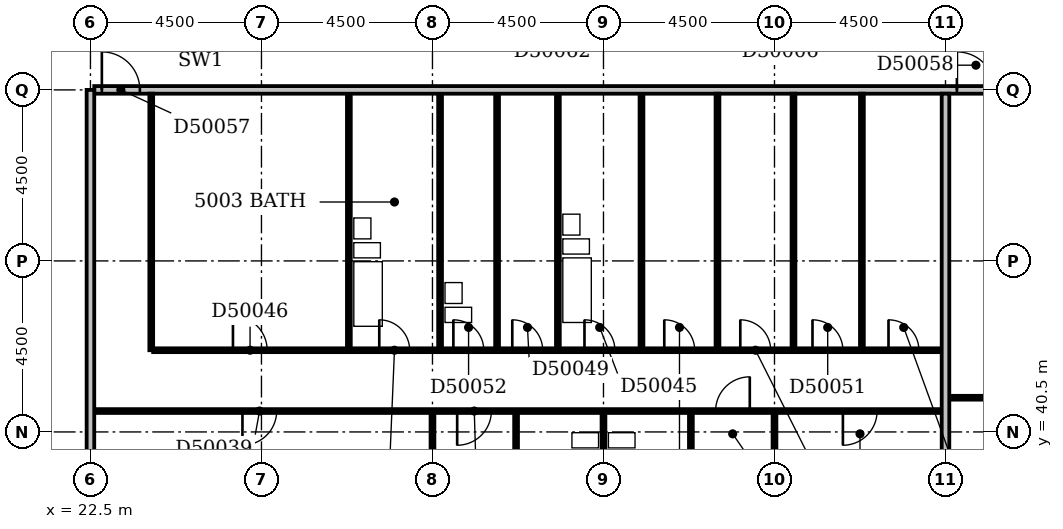
"""IFC4 building model, lengths in metres.
Left out: names, types, materials, properties, quantities, classifications, styles, units other than length and angle.
Written with IfcOpenShell. Run it as: python <this file> out.ifc"""

import sys

from ifc_helpers import new_model, si_unit, direction, frame, frame_2d, origin, place, context, subcontext, project, spatial, rectangle, extrude, element, fill, save


model = new_model("IFC4")
c1 = context("Model", 3, precision=1e-05, world=origin(), true_north=direction((0.0, 1.0)))
c2 = subcontext(c1, "Body", "Model", "MODEL_VIEW")
j1 = project(units=[si_unit("LENGTHUNIT", "METRE"), si_unit("PLANEANGLEUNIT", "RADIAN")], contexts=[c1])
p1 = place(None, origin())
s1 = spatial("IfcSite", under=j1, at=p1, CompositionType="ELEMENT")
p2 = place(p1, origin())
s2 = spatial("IfcBuilding", under=s1, at=p2, CompositionType="ELEMENT")
p3 = place(p2, frame((0.0, 0.0, 197.0)))
s3 = spatial("IfcBuildingStorey", under=s2, at=p3, CompositionType="ELEMENT", Elevation=197.0)
p4 = place(p3, frame((22.5, 36.45, 0.0), z_axis=(0.0, 0.0, 1.0), x_axis=(0.0, 1.0, 0.0)))
e1 = element("IfcWall", 1, at=p4, inside=s3, PredefinedType="PARTITIONING", context=c2, shape_type="SweptSolid", body=[
    extrude(rectangle(XDim=13.05, YDim=0.2, at=frame_2d((6.525, 0.0))), origin(), (0.0, 0.0, 1.0), 3.3),
])
p5 = place(p3, frame((31.5, 36.45, 0.0), z_axis=(0.0, 0.0, 1.0), x_axis=(0.0, 1.0, 0.0)))
e2 = element("IfcWall", 2, at=p5, inside=s3, PredefinedType="PARTITIONING", context=c2, shape_type="SweptSolid", body=[
    extrude(rectangle(XDim=4.55, YDim=0.1, at=frame_2d((2.275, 0.0))), origin(), (0.0, 0.0, 1.0), 3.3),
])
p6 = place(p3, frame((36.0, 36.45, 0.0), z_axis=(0.0, 0.0, 1.0), x_axis=(0.0, 1.0, 0.0)))
e3 = element("IfcWall", 3, at=p6, inside=s3, PredefinedType="PARTITIONING", context=c2, shape_type="SweptSolid", body=[
    extrude(rectangle(XDim=4.55, YDim=0.1, at=frame_2d((2.275, 0.0))), origin(), (0.0, 0.0, 1.0), 2.4),
])
p7 = place(p3, frame((40.5, 36.45, 0.0), z_axis=(0.0, 0.0, 1.0), x_axis=(0.0, 1.0, 0.0)))
e4 = element("IfcWall", 4, at=p7, inside=s3, PredefinedType="PARTITIONING", context=c2, shape_type="SweptSolid", body=[
    extrude(rectangle(XDim=4.55, YDim=0.1, at=frame_2d((2.275, 0.0))), origin(), (0.0, 0.0, 1.0), 3.3),
])
p8 = place(p3, frame((45.0, 36.45, 0.0), z_axis=(0.0, 0.0, 1.0), x_axis=(0.0, 1.0, 0.0)))
e5 = element("IfcWall", 5, at=p8, inside=s3, PredefinedType="PARTITIONING", context=c2, shape_type="SweptSolid", body=[
    extrude(rectangle(XDim=12.95, YDim=0.2, at=frame_2d((6.475, 0.0))), origin(), (0.0, 0.0, 1.0), 2.6),
])
p9 = place(p3, frame((33.7, 38.15, 0.0), z_axis=(0.0, 0.0, 1.0), x_axis=(0.0, 1.0, 0.0)))
e6 = element("IfcWall", 6, at=p9, inside=s3, PredefinedType="PLUMBINGWALL", context=c2, shape_type="SweptSolid", body=[
    extrude(rectangle(XDim=2.85, YDim=0.1, at=frame_2d((1.425, 0.0))), origin(), (0.0, 0.0, 1.0), 3.3),
])
p10 = place(p9, frame((1.05, 0.0, 0.0)))
e7 = element("IfcOpeningElement", 7, at=p10, cuts=e6, PredefinedType="OPENING", context=c2, shape_type="SweptSolid", body=[
    extrude(rectangle(XDim=0.8, YDim=2.1, at=frame_2d((0.4, 1.05))), frame((0.0, 0.062, 0.0), z_axis=(0.0, -1.0, 0.0), x_axis=(1.0, 0.0, 0.0)), (0.0, 0.0, 1.0), 0.124),
])
p11 = place(p3, frame((38.3, 38.15, 0.0), z_axis=(0.0, 0.0, 1.0), x_axis=(0.0, 1.0, 0.0)))
e8 = element("IfcWall", 8, at=p11, inside=s3, PredefinedType="PLUMBINGWALL", context=c2, shape_type="SweptSolid", body=[
    extrude(rectangle(XDim=2.85, YDim=0.1, at=frame_2d((1.425, 0.0))), origin(), (0.0, 0.0, 1.0), 3.3),
])
p12 = place(p11, frame((1.05, 0.0, 0.0)))
e9 = element("IfcOpeningElement", 9, at=p12, cuts=e8, PredefinedType="OPENING", context=c2, shape_type="SweptSolid", body=[
    extrude(rectangle(XDim=0.8, YDim=2.1, at=frame_2d((0.4, 1.05))), frame((0.0, 0.062, 0.0), z_axis=(0.0, -1.0, 0.0), x_axis=(1.0, 0.0, 0.0)), (0.0, 0.0, 1.0), 0.124),
])
p13 = place(p3, frame((22.6, 41.05, 0.0), z_axis=(0.0, 0.0, 1.0), x_axis=(1.0, 0.0, 0.0)))
e10 = element("IfcWall", 10, at=p13, inside=s3, PredefinedType="PARTITIONING", context=c2, shape_type="SweptSolid", body=[
    extrude(rectangle(XDim=22.3, YDim=0.1, at=frame_2d((11.15, 0.0))), origin(), (0.0, 0.0, 1.0), 3.3),
])
p14 = place(p13, frame((3.9, 0.0, 0.0)))
e11 = element("IfcOpeningElement", 11, at=p14, cuts=e10, PredefinedType="OPENING", context=c2, shape_type="SweptSolid", body=[
    extrude(rectangle(XDim=0.9, YDim=2.1, at=frame_2d((0.45, 1.05))), frame((0.0, 0.062, 0.0), z_axis=(0.0, -1.0, 0.0), x_axis=(1.0, 0.0, 0.0)), (0.0, 0.0, 1.0), 0.124),
])
p15 = place(p13, frame((9.55, 0.0, 0.0)))
e12 = element("IfcOpeningElement", 12, at=p15, cuts=e10, PredefinedType="OPENING", context=c2, shape_type="SweptSolid", body=[
    extrude(rectangle(XDim=0.9, YDim=2.1, at=frame_2d((0.45, 1.05))), frame((0.0, 0.062, 0.0), z_axis=(0.0, -1.0, 0.0), x_axis=(1.0, 0.0, 0.0)), (0.0, 0.0, 1.0), 0.124),
])
p16 = place(p13, frame((16.35, 0.0, 0.0)))
e13 = element("IfcOpeningElement", 13, at=p16, cuts=e10, PredefinedType="OPENING", context=c2, shape_type="SweptSolid", body=[
    extrude(rectangle(XDim=0.9, YDim=2.1, at=frame_2d((0.45, 1.05))), frame((0.0, 0.062, 0.0), z_axis=(0.0, -1.0, 0.0), x_axis=(1.0, 0.0, 0.0)), (0.0, 0.0, 1.0), 0.124),
])
p17 = place(p13, frame((19.7, 0.0, 0.0)))
e14 = element("IfcOpeningElement", 14, at=p17, cuts=e10, PredefinedType="OPENING", context=c2, shape_type="SweptSolid", body=[
    extrude(rectangle(XDim=0.9, YDim=2.1, at=frame_2d((0.45, 1.05))), frame((0.0, 0.062, 0.0), z_axis=(0.0, -1.0, 0.0), x_axis=(1.0, 0.0, 0.0)), (0.0, 0.0, 1.0), 0.124),
])
p18 = place(p3, frame((45.1, 41.4, 0.0), z_axis=(0.0, 0.0, 1.0), x_axis=(1.0, 0.0, 0.0)))
e15 = element("IfcWall", 15, at=p18, inside=s3, PredefinedType="PARTITIONING", context=c2, shape_type="SweptSolid", body=[
    extrude(rectangle(XDim=9.5, YDim=0.1, at=frame_2d((4.75, 0.0))), origin(), (0.0, 0.0, 1.0), 3.3),
])
p19 = place(p18, frame((3.95, 0.0, 0.0)))
e16 = element("IfcOpeningElement", 16, at=p19, cuts=e15, PredefinedType="OPENING", context=c2, shape_type="SweptSolid", body=[
    extrude(rectangle(XDim=0.9, YDim=2.1, at=frame_2d((0.45, 1.05))), frame((0.0, 0.062, 0.0), z_axis=(0.0, -1.0, 0.0), x_axis=(1.0, 0.0, 0.0)), (0.0, 0.0, 1.0), 0.124),
])
p20 = place(p3, frame((24.1, 42.65, 0.0), z_axis=(0.0, 0.0, 1.0), x_axis=(0.0, 1.0, 0.0)))
e17 = element("IfcWall", 17, at=p20, inside=s3, PredefinedType="PARTITIONING", context=c2, shape_type="SweptSolid", body=[
    extrude(rectangle(XDim=6.75, YDim=0.1, at=frame_2d((3.375, 0.0))), origin(), (0.0, 0.0, 1.0), 3.3),
])
p21 = place(p3, frame((24.15, 42.65, 0.0), z_axis=(0.0, 0.0, 1.0), x_axis=(1.0, 0.0, 0.0)))
e18 = element("IfcWall", 18, at=p21, inside=s3, PredefinedType="PARTITIONING", context=c2, shape_type="SweptSolid", body=[
    extrude(rectangle(XDim=20.75, YDim=0.1, at=frame_2d((10.375, 0.0))), origin(), (0.0, 0.0, 1.0), 3.3),
])
p22 = place(p21, frame((5.95, 0.0, 0.0)))
e19 = element("IfcOpeningElement", 19, at=p22, cuts=e18, PredefinedType="OPENING", context=c2, shape_type="SweptSolid", body=[
    extrude(rectangle(XDim=0.8, YDim=2.1, at=frame_2d((0.4, 1.05))), frame((0.0, 0.062, 0.0), z_axis=(0.0, -1.0, 0.0), x_axis=(1.0, 0.0, 0.0)), (0.0, 0.0, 1.0), 0.124),
])
p23 = place(p21, frame((11.35, 0.0, 0.0)))
e20 = element("IfcOpeningElement", 20, at=p23, cuts=e18, PredefinedType="OPENING", context=c2, shape_type="SweptSolid", body=[
    extrude(rectangle(XDim=0.8, YDim=2.1, at=frame_2d((0.4, 1.05))), frame((0.0, 0.062, 0.0), z_axis=(0.0, -1.0, 0.0), x_axis=(1.0, 0.0, 0.0)), (0.0, 0.0, 1.0), 0.124),
])
p24 = place(p21, frame((2.1, 0.0, 0.0)))
e21 = element("IfcOpeningElement", 21, at=p24, cuts=e18, PredefinedType="OPENING", context=c2, shape_type="SweptSolid", body=[
    extrude(rectangle(XDim=0.9, YDim=2.1, at=frame_2d((0.45, 1.05))), frame((0.0, 0.062, 0.0), z_axis=(0.0, -1.0, 0.0), x_axis=(1.0, 0.0, 0.0)), (0.0, 0.0, 1.0), 0.124),
])
p25 = place(p21, frame((19.35, 0.0, 0.0)))
e22 = element("IfcOpeningElement", 22, at=p25, cuts=e18, PredefinedType="OPENING", context=c2, shape_type="SweptSolid", body=[
    extrude(rectangle(XDim=0.8, YDim=2.1, at=frame_2d((0.4, 1.05))), frame((0.0, 0.062, 0.0), z_axis=(0.0, -1.0, 0.0), x_axis=(1.0, 0.0, 0.0)), (0.0, 0.0, 1.0), 0.124),
])
p26 = place(p21, frame((15.45, 0.0, 0.0)))
e23 = element("IfcOpeningElement", 23, at=p26, cuts=e18, PredefinedType="OPENING", context=c2, shape_type="SweptSolid", body=[
    extrude(rectangle(XDim=0.8, YDim=2.1, at=frame_2d((0.4, 1.05))), frame((0.0, 0.062, 0.0), z_axis=(0.0, -1.0, 0.0), x_axis=(1.0, 0.0, 0.0)), (0.0, 0.0, 1.0), 0.124),
])
p27 = place(p21, frame((9.45, 0.0, 0.0)))
e24 = element("IfcOpeningElement", 24, at=p27, cuts=e18, PredefinedType="OPENING", context=c2, shape_type="SweptSolid", body=[
    extrude(rectangle(XDim=0.8, YDim=2.1, at=frame_2d((0.4, 1.05))), frame((0.0, 0.062, 0.0), z_axis=(0.0, -1.0, 0.0), x_axis=(1.0, 0.0, 0.0)), (0.0, 0.0, 1.0), 0.124),
])
p28 = place(p21, frame((13.45, 0.0, 0.0)))
e25 = element("IfcOpeningElement", 25, at=p28, cuts=e18, PredefinedType="OPENING", context=c2, shape_type="SweptSolid", body=[
    extrude(rectangle(XDim=0.8, YDim=2.1, at=frame_2d((0.4, 1.05))), frame((0.0, 0.062, 0.0), z_axis=(0.0, -1.0, 0.0), x_axis=(1.0, 0.0, 0.0)), (0.0, 0.0, 1.0), 0.124),
])
p29 = place(p21, frame((17.35, 0.0, 0.0)))
e26 = element("IfcOpeningElement", 26, at=p29, cuts=e18, PredefinedType="OPENING", context=c2, shape_type="SweptSolid", body=[
    extrude(rectangle(XDim=0.8, YDim=2.1, at=frame_2d((0.4, 1.05))), frame((0.0, 0.062, 0.0), z_axis=(0.0, -1.0, 0.0), x_axis=(1.0, 0.0, 0.0)), (0.0, 0.0, 1.0), 0.124),
])
p30 = place(p21, frame((7.9, 0.0, 0.0)))
e27 = element("IfcOpeningElement", 27, at=p30, cuts=e18, PredefinedType="OPENING", context=c2, shape_type="SweptSolid", body=[
    extrude(rectangle(XDim=0.8, YDim=2.1, at=frame_2d((0.4, 1.05))), frame((0.0, 0.062, 0.0), z_axis=(0.0, -1.0, 0.0), x_axis=(1.0, 0.0, 0.0)), (0.0, 0.0, 1.0), 0.124),
])
for number, where, z_axis, x_axis in (
    (28, (29.3, 42.7, 0.0), (0.0, 0.0, 1.0), (0.0, 1.0, 0.0)),
    (29, (31.7, 42.7, 0.0), (0.0, 0.0, 1.0), (0.0, 1.0, 0.0)),
    (30, (33.2, 42.7, 0.0), (0.0, 0.0, 1.0), (0.0, 1.0, 0.0)),
    (31, (34.8, 42.7, 0.0), (0.0, 0.0, 1.0), (0.0, 1.0, 0.0)),
    (32, (37.0, 42.7, 0.0), (0.0, 0.0, 1.0), (0.0, 1.0, 0.0)),
):
    element("IfcWall", number, at=place(p3, frame(where, z_axis=z_axis, x_axis=x_axis)), inside=s3, PredefinedType="PLUMBINGWALL", context=c2, shape_type="SweptSolid", body=[
        extrude(rectangle(XDim=6.7, YDim=0.1, at=frame_2d((3.35, 0.0))), origin(), (0.0, 0.0, 1.0), 3.3),
    ])
for number, where, z_axis, x_axis in (
    (33, (39.0, 42.7, 0.0), (0.0, 0.0, 1.0), (0.0, 1.0, 0.0)),
    (34, (41.0, 42.7, 0.0), (0.0, 0.0, 1.0), (0.0, 1.0, 0.0)),
    (35, (42.8, 42.7, 0.0), (0.0, 0.0, 1.0), (0.0, 1.0, 0.0)),
):
    element("IfcWall", number, at=place(p3, frame(where, z_axis=z_axis, x_axis=x_axis)), inside=s3, PredefinedType="PARTITIONING", context=c2, shape_type="SweptSolid", body=[
        extrude(rectangle(XDim=6.7, YDim=0.1, at=frame_2d((3.35, 0.0))), origin(), (0.0, 0.0, 1.0), 3.3),
    ])
p31 = place(p3, frame((22.6, 49.5, 0.0), z_axis=(0.0, 0.0, 1.0), x_axis=(1.0, 0.0, 0.0)))
e36 = element("IfcWall", 36, at=p31, inside=s3, PredefinedType="PARTITIONING", context=c2, shape_type="SweptSolid", body=[
    extrude(rectangle(XDim=30.95, YDim=0.2, at=frame_2d((15.475, 0.0))), origin(), (0.0, 0.0, 1.0), 3.3),
])
p32 = place(p31, frame((0.2, 0.0, 0.0)))
e37 = element("IfcOpeningElement", 37, at=p32, cuts=e36, PredefinedType="OPENING", context=c2, shape_type="SweptSolid", body=[
    extrude(rectangle(XDim=1.0, YDim=2.1, at=frame_2d((0.5, 1.05))), frame((0.0, 0.112, 0.0), z_axis=(0.0, -1.0, 0.0), x_axis=(1.0, 0.0, 0.0)), (0.0, 0.0, 1.0), 0.224),
])
p33 = place(p31, frame((22.7, 0.0, 0.0)))
e38 = element("IfcOpeningElement", 38, at=p33, cuts=e36, PredefinedType="OPENING", context=c2, shape_type="SweptSolid", body=[
    extrude(rectangle(XDim=1.0, YDim=2.1, at=frame_2d((0.5, 1.05))), frame((0.0, 0.112, 0.0), z_axis=(0.0, -1.0, 0.0), x_axis=(1.0, 0.0, 0.0)), (0.0, 0.0, 1.0), 0.224),
])
p34 = place(p14, frame((0.9, 0.0, 0.0), z_axis=(0.0, 0.0, 1.0), x_axis=(-1.0, 0.0, 0.0)))
e39 = element("IfcDoor", 39, at=p34, inside=s3, OperationType="SINGLE_SWING_RIGHT", PredefinedType="DOOR", context=c2, shape_type="SweptSolid", body=[
    extrude(rectangle(XDim=0.9, YDim=2.1, at=frame_2d((0.45, 1.05))), frame((0.0, 0.025, 0.0), z_axis=(0.0, -1.0, 0.0), x_axis=(1.0, 0.0, 0.0)), (0.0, 0.0, 1.0), 0.05),
])
fill(e11, e39)
p35 = place(p15, frame((0.9, 0.0, 0.0), z_axis=(0.0, 0.0, 1.0), x_axis=(-1.0, 0.0, 0.0)))
e40 = element("IfcDoor", 40, at=p35, inside=s3, OperationType="SINGLE_SWING_RIGHT", PredefinedType="DOOR", context=c2, shape_type="SweptSolid", body=[
    extrude(rectangle(XDim=0.9, YDim=2.1, at=frame_2d((0.45, 1.05))), frame((0.0, 0.025, 0.0), z_axis=(0.0, -1.0, 0.0), x_axis=(1.0, 0.0, 0.0)), (0.0, 0.0, 1.0), 0.05),
])
fill(e12, e40)
p36 = place(p16, frame((0.9, 0.0, 0.0), z_axis=(0.0, 0.0, 1.0), x_axis=(-1.0, 0.0, 0.0)))
e41 = element("IfcDoor", 41, at=p36, inside=s3, OperationType="SINGLE_SWING_LEFT", PredefinedType="DOOR", context=c2, shape_type="SweptSolid", body=[
    extrude(rectangle(XDim=0.9, YDim=2.1, at=frame_2d((0.45, 1.05))), frame((0.0, 0.025, 0.0), z_axis=(0.0, -1.0, 0.0), x_axis=(1.0, 0.0, 0.0)), (0.0, 0.0, 1.0), 0.05),
])
fill(e13, e41)
p37 = place(p17, frame((0.9, 0.0, 0.0), z_axis=(0.0, 0.0, 1.0), x_axis=(-1.0, 0.0, 0.0)))
e42 = element("IfcDoor", 42, at=p37, inside=s3, OperationType="SINGLE_SWING_RIGHT", PredefinedType="DOOR", context=c2, shape_type="SweptSolid", body=[
    extrude(rectangle(XDim=0.9, YDim=2.1, at=frame_2d((0.45, 1.05))), frame((0.0, 0.025, 0.0), z_axis=(0.0, -1.0, 0.0), x_axis=(1.0, 0.0, 0.0)), (0.0, 0.0, 1.0), 0.05),
])
fill(e14, e42)
p38 = place(p22, origin())
e43 = element("IfcDoor", 43, at=p38, inside=s3, OperationType="SINGLE_SWING_LEFT", PredefinedType="DOOR", context=c2, shape_type="SweptSolid", body=[
    extrude(rectangle(XDim=0.8, YDim=2.1, at=frame_2d((0.4, 1.05))), frame((0.0, 0.025, 0.0), z_axis=(0.0, -1.0, 0.0), x_axis=(1.0, 0.0, 0.0)), (0.0, 0.0, 1.0), 0.05),
])
fill(e19, e43)
p39 = place(p23, origin())
e44 = element("IfcDoor", 44, at=p39, inside=s3, OperationType="SINGLE_SWING_LEFT", PredefinedType="DOOR", context=c2, shape_type="SweptSolid", body=[
    extrude(rectangle(XDim=0.8, YDim=2.1, at=frame_2d((0.4, 1.05))), frame((0.0, 0.025, 0.0), z_axis=(0.0, -1.0, 0.0), x_axis=(1.0, 0.0, 0.0)), (0.0, 0.0, 1.0), 0.05),
])
fill(e20, e44)
p40 = place(p24, origin())
e45 = element("IfcDoor", 45, at=p40, inside=s3, OperationType="SINGLE_SWING_LEFT", PredefinedType="DOOR", context=c2, shape_type="SweptSolid", body=[
    extrude(rectangle(XDim=0.9, YDim=2.1, at=frame_2d((0.45, 1.05))), frame((0.0, 0.025, 0.0), z_axis=(0.0, -1.0, 0.0), x_axis=(1.0, 0.0, 0.0)), (0.0, 0.0, 1.0), 0.05),
])
fill(e21, e45)
p41 = place(p25, origin())
e46 = element("IfcDoor", 46, at=p41, inside=s3, OperationType="SINGLE_SWING_LEFT", PredefinedType="DOOR", context=c2, shape_type="SweptSolid", body=[
    extrude(rectangle(XDim=0.8, YDim=2.1, at=frame_2d((0.4, 1.05))), frame((0.0, 0.025, 0.0), z_axis=(0.0, -1.0, 0.0), x_axis=(1.0, 0.0, 0.0)), (0.0, 0.0, 1.0), 0.05),
])
fill(e22, e46)
p42 = place(p26, origin())
e47 = element("IfcDoor", 47, at=p42, inside=s3, OperationType="SINGLE_SWING_LEFT", PredefinedType="DOOR", context=c2, shape_type="SweptSolid", body=[
    extrude(rectangle(XDim=0.8, YDim=2.1, at=frame_2d((0.4, 1.05))), frame((0.0, 0.025, 0.0), z_axis=(0.0, -1.0, 0.0), x_axis=(1.0, 0.0, 0.0)), (0.0, 0.0, 1.0), 0.05),
])
fill(e23, e47)
p43 = place(p27, origin())
e48 = element("IfcDoor", 48, at=p43, inside=s3, OperationType="SINGLE_SWING_LEFT", PredefinedType="DOOR", context=c2, shape_type="SweptSolid", body=[
    extrude(rectangle(XDim=0.8, YDim=2.1, at=frame_2d((0.4, 1.05))), frame((0.0, 0.025, 0.0), z_axis=(0.0, -1.0, 0.0), x_axis=(1.0, 0.0, 0.0)), (0.0, 0.0, 1.0), 0.05),
])
fill(e24, e48)
p44 = place(p28, origin())
e49 = element("IfcDoor", 49, at=p44, inside=s3, OperationType="SINGLE_SWING_LEFT", PredefinedType="DOOR", context=c2, shape_type="SweptSolid", body=[
    extrude(rectangle(XDim=0.8, YDim=2.1, at=frame_2d((0.4, 1.05))), frame((0.0, 0.025, 0.0), z_axis=(0.0, -1.0, 0.0), x_axis=(1.0, 0.0, 0.0)), (0.0, 0.0, 1.0), 0.05),
])
fill(e25, e49)
p45 = place(p29, origin())
e50 = element("IfcDoor", 50, at=p45, inside=s3, OperationType="SINGLE_SWING_LEFT", PredefinedType="DOOR", context=c2, shape_type="SweptSolid", body=[
    extrude(rectangle(XDim=0.8, YDim=2.1, at=frame_2d((0.4, 1.05))), frame((0.0, 0.025, 0.0), z_axis=(0.0, -1.0, 0.0), x_axis=(1.0, 0.0, 0.0)), (0.0, 0.0, 1.0), 0.05),
])
fill(e26, e50)
p46 = place(p30, origin())
e51 = element("IfcDoor", 51, at=p46, inside=s3, OperationType="SINGLE_SWING_LEFT", PredefinedType="DOOR", context=c2, shape_type="SweptSolid", body=[
    extrude(rectangle(XDim=0.8, YDim=2.1, at=frame_2d((0.4, 1.05))), frame((0.0, 0.025, 0.0), z_axis=(0.0, -1.0, 0.0), x_axis=(1.0, 0.0, 0.0)), (0.0, 0.0, 1.0), 0.05),
])
fill(e27, e51)
p47 = place(p32, origin())
e52 = element("IfcDoor", 52, at=p47, inside=s3, OperationType="SINGLE_SWING_LEFT", PredefinedType="DOOR", context=c2, shape_type="SweptSolid", body=[
    extrude(rectangle(XDim=1.0, YDim=2.1, at=frame_2d((0.5, 1.05))), frame((0.0, 0.025, 0.0), z_axis=(0.0, -1.0, 0.0), x_axis=(1.0, 0.0, 0.0)), (0.0, 0.0, 1.0), 0.05),
])
fill(e37, e52)
p48 = place(p33, origin())
e53 = element("IfcDoor", 53, at=p48, inside=s3, OperationType="SINGLE_SWING_LEFT", PredefinedType="DOOR", context=c2, shape_type="SweptSolid", body=[
    extrude(rectangle(XDim=1.0, YDim=2.1, at=frame_2d((0.5, 1.05))), frame((0.0, 0.025, 0.0), z_axis=(0.0, -1.0, 0.0), x_axis=(1.0, 0.0, 0.0)), (0.0, 0.0, 1.0), 0.05),
])
fill(e38, e53)
save(model, sys.argv[1])
